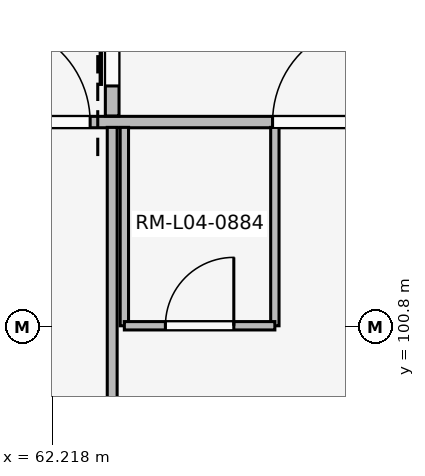
"""IFC4 building model, lengths in metres.
Left out: names, types, materials, properties, quantities, classifications, styles, units other than length and angle.
Written with IfcOpenShell. Run it as: python <this file> out.ifc"""

import sys

from ifc_helpers import new_model, si_unit, direction, frame, frame_2d, origin, place, context, subcontext, project, spatial, rectangle, extrude, element, fill, save


model = new_model("IFC4")
c1 = context("Model", 3, precision=1e-05, world=origin(), true_north=direction((0.0, 1.0)))
c2 = subcontext(c1, "Body", "Model", "MODEL_VIEW")
j1 = project(units=[si_unit("LENGTHUNIT", "METRE"), si_unit("PLANEANGLEUNIT", "RADIAN")], contexts=[c1])
p1 = place(None, origin())
s1 = spatial("IfcSite", under=j1, at=p1, CompositionType="ELEMENT")
p2 = place(p1, origin())
s2 = spatial("IfcBuilding", under=s1, at=p2, CompositionType="ELEMENT")
p3 = place(p2, frame((0.0, 0.0, 16.2)))
s3 = spatial("IfcBuildingStorey", under=s2, at=p3, CompositionType="ELEMENT", Elevation=16.2)
p4 = place(p3, frame((58.88, 103.5, 0.0), z_axis=(0.0, 0.0, 1.0), x_axis=(1.0, 0.0, 0.0)))
e1 = element("IfcWall", 1, at=p4, inside=s3, PredefinedType="PARTITIONING", context=c2, shape_type="SweptSolid", body=[
    extrude(rectangle(XDim=8.24, YDim=0.15, at=frame_2d((4.12, 0.0))), origin(), (0.0, 0.0, 1.0), 3.3),
])
p5 = place(p4, frame((2.53, 0.0, 0.0)))
e2 = element("IfcOpeningElement", 2, at=p5, cuts=e1, PredefinedType="OPENING", context=c2, shape_type="SweptSolid", body=[
    extrude(rectangle(XDim=1.3, YDim=2.25, at=frame_2d((0.65, 1.125))), frame((0.0, 0.085, 0.0), z_axis=(0.0, -1.0, 0.0), x_axis=(1.0, 0.0, 0.0)), (0.0, 0.0, 1.0), 0.17),
])
p6 = place(p4, frame((6.23, 0.0, 0.0)))
e3 = element("IfcOpeningElement", 3, at=p6, cuts=e1, PredefinedType="OPENING", context=c2, shape_type="SweptSolid", body=[
    extrude(rectangle(XDim=1.3, YDim=2.25, at=frame_2d((0.65, 1.125))), frame((0.0, 0.085, 0.0), z_axis=(0.0, -1.0, 0.0), x_axis=(1.0, 0.0, 0.0)), (0.0, 0.0, 1.0), 0.17),
])
p7 = place(p3, frame((63.0, 92.5, 0.0), z_axis=(0.0, 0.0, 1.0), x_axis=(0.0, 1.0, 0.0)))
e4 = element("IfcWall", 4, at=p7, inside=s3, PredefinedType="PARTITIONING", context=c2, shape_type="SweptSolid", body=[
    extrude(rectangle(XDim=10.93, YDim=0.13, at=frame_2d((5.465, 0.0))), origin(), (0.0, 0.0, 1.0), 3.3),
])
for number, where, z_axis, x_axis in (
    (5, (63.16, 100.82, 0.0), (0.0, 0.0, 1.0), (0.0, 1.0, 0.0)),
    (6, (65.14, 100.82, 0.0), (0.0, 0.0, 1.0), (0.0, 1.0, 0.0)),
):
    element("IfcWall", number, at=place(p3, frame(where, z_axis=z_axis, x_axis=x_axis)), inside=s3, PredefinedType="PARTITIONING", context=c2, shape_type="SweptSolid", body=[
        extrude(rectangle(XDim=2.61, YDim=0.11, at=frame_2d((1.305, 0.0))), origin(), (0.0, 0.0, 1.0), 3.3),
    ])
p8 = place(p3, frame((63.16, 100.82, 0.0), z_axis=(0.0, 0.0, 1.0), x_axis=(1.0, 0.0, 0.0)))
e7 = element("IfcWall", 7, at=p8, inside=s3, PredefinedType="PARTITIONING", context=c2, shape_type="SweptSolid", body=[
    extrude(rectangle(XDim=1.98, YDim=0.11, at=frame_2d((0.99, 0.0))), origin(), (0.0, 0.0, 1.0), 3.3),
])
p9 = place(p8, frame((0.54, 0.0, 0.0)))
e8 = element("IfcOpeningElement", 8, at=p9, cuts=e7, PredefinedType="OPENING", context=c2, shape_type="SweptSolid", body=[
    extrude(rectangle(XDim=0.9, YDim=2.1, at=frame_2d((0.45, 1.05))), frame((0.0, 0.065, 0.0), z_axis=(0.0, -1.0, 0.0), x_axis=(1.0, 0.0, 0.0)), (0.0, 0.0, 1.0), 0.13),
])
p10 = place(p3, frame((63.0, 103.58, 0.0), z_axis=(0.0, 0.0, 1.0), x_axis=(0.0, 1.0, 0.0)))
e9 = element("IfcWall", 9, at=p10, inside=s3, PredefinedType="PARTITIONING", context=c2, shape_type="SweptSolid", body=[
    extrude(rectangle(XDim=2.84, YDim=0.18, at=frame_2d((1.42, 0.0))), origin(), (0.0, 0.0, 1.0), 3.3),
])
p11 = place(p10, frame((0.395, 0.0, 0.0)))
e10 = element("IfcOpeningElement", 10, at=p11, cuts=e9, PredefinedType="OPENING", context=c2, shape_type="SweptSolid", body=[
    extrude(rectangle(XDim=2.05, YDim=2.35, at=frame_2d((1.025, 1.175))), frame((0.0, 0.1, 0.0), z_axis=(0.0, -1.0, 0.0), x_axis=(1.0, 0.0, 0.0)), (0.0, 0.0, 1.0), 0.2),
])
p12 = place(p5, origin())
e11 = element("IfcDoor", 11, at=p12, inside=s3, OperationType="SINGLE_SWING_LEFT", PredefinedType="DOOR", context=c2, shape_type="SweptSolid", body=[
    extrude(rectangle(XDim=1.3, YDim=2.25, at=frame_2d((0.65, 1.125))), frame((0.0, 0.025, 0.0), z_axis=(0.0, -1.0, 0.0), x_axis=(1.0, 0.0, 0.0)), (0.0, 0.0, 1.0), 0.05),
])
fill(e2, e11)
p13 = place(p6, origin())
e12 = element("IfcDoor", 12, at=p13, inside=s3, OperationType="SINGLE_SWING_RIGHT", PredefinedType="DOOR", context=c2, shape_type="SweptSolid", body=[
    extrude(rectangle(XDim=1.3, YDim=2.25, at=frame_2d((0.65, 1.125))), frame((0.0, 0.025, 0.0), z_axis=(0.0, -1.0, 0.0), x_axis=(1.0, 0.0, 0.0)), (0.0, 0.0, 1.0), 0.05),
])
fill(e3, e12)
p14 = place(p9, origin())
e13 = element("IfcDoor", 13, at=p14, inside=s3, OperationType="SINGLE_SWING_RIGHT", PredefinedType="DOOR", context=c2, shape_type="SweptSolid", body=[
    extrude(rectangle(XDim=0.9, YDim=2.1, at=frame_2d((0.45, 1.05))), frame((0.0, 0.025, 0.0), z_axis=(0.0, -1.0, 0.0), x_axis=(1.0, 0.0, 0.0)), (0.0, 0.0, 1.0), 0.05),
])
fill(e8, e13)
p15 = place(p11, origin())
e14 = element("IfcDoor", 14, at=p15, inside=s3, OperationType="SLIDING_TO_LEFT", PredefinedType="DOOR", context=c2, shape_type="SweptSolid", body=[
    extrude(rectangle(XDim=2.05, YDim=2.35, at=frame_2d((1.025, 1.175))), frame((0.0, 0.025, 0.0), z_axis=(0.0, -1.0, 0.0), x_axis=(1.0, 0.0, 0.0)), (0.0, 0.0, 1.0), 0.05),
])
fill(e10, e14)
save(model, sys.argv[1])
